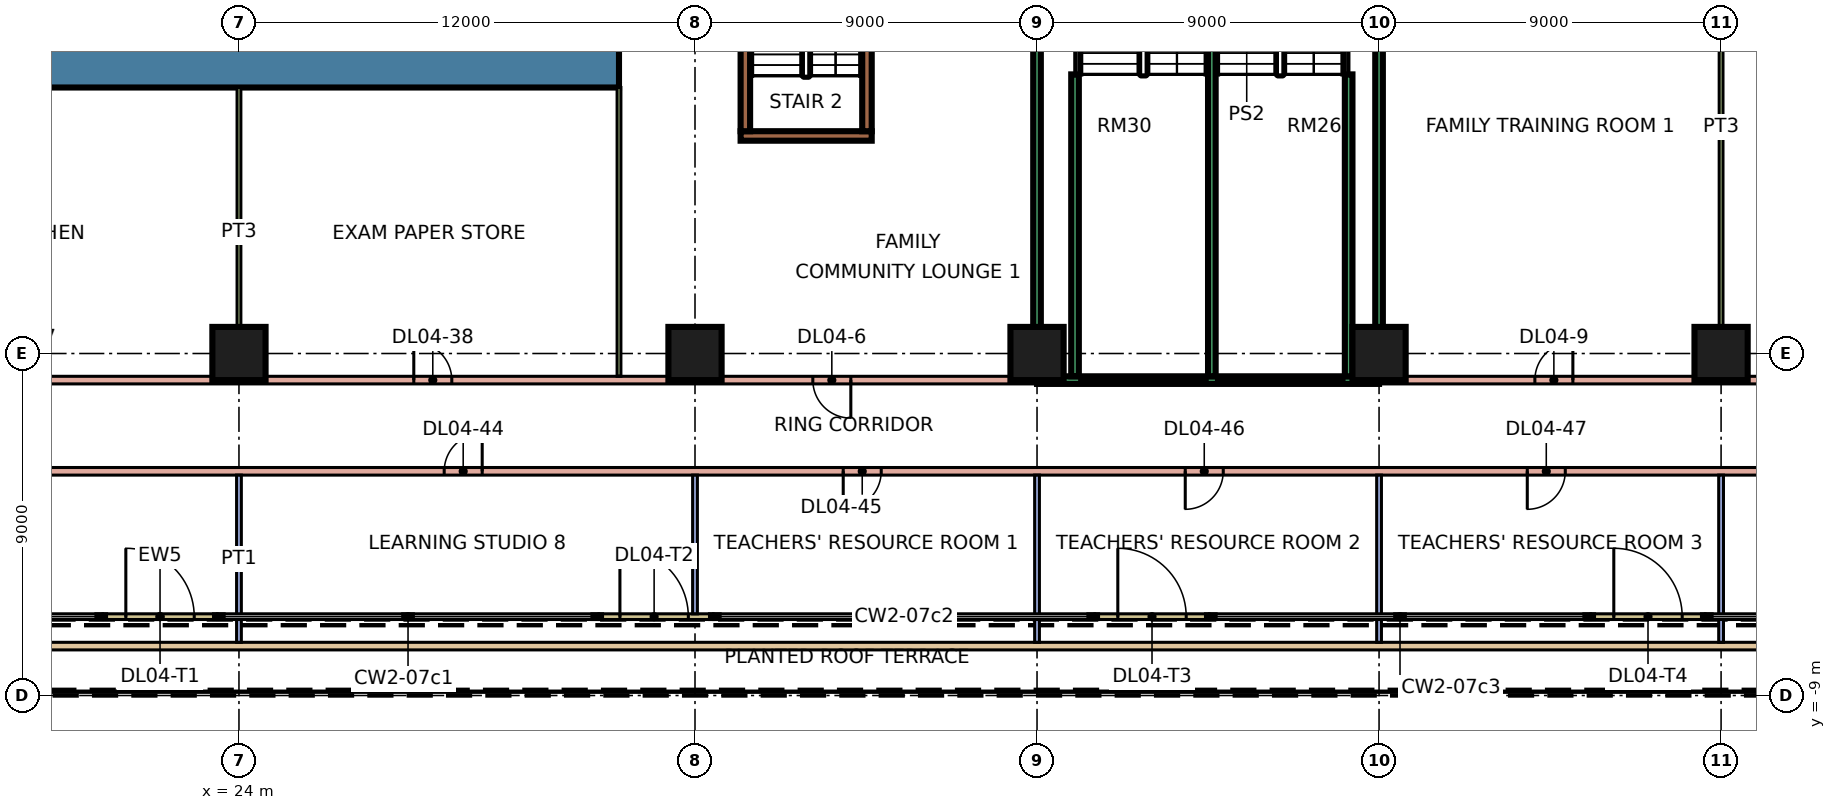
"""IFC4 building model, lengths in metres.
Left out: names, types, materials, properties, quantities, classifications, styles, units other than length and angle.
Written with IfcOpenShell. Run it as: python <this file> out.ifc"""

import sys

from ifc_helpers import new_model, si_unit, direction, frame, frame_2d, origin, origin_2d, place, context, subcontext, project, spatial, rectangle, extrude, element, fill, save


model = new_model("IFC4")
c1 = context("Model", 3, precision=1e-05, world=origin(), true_north=direction((0.0, 1.0)))
c2 = subcontext(c1, "Body", "Model", "MODEL_VIEW")
j1 = project(units=[si_unit("LENGTHUNIT", "METRE"), si_unit("PLANEANGLEUNIT", "RADIAN")], contexts=[c1])
p1 = place(None, origin())
s1 = spatial("IfcSite", under=j1, at=p1, CompositionType="ELEMENT")
p2 = place(p1, origin())
s2 = spatial("IfcBuilding", under=s1, at=p2, CompositionType="ELEMENT")
p3 = place(p2, frame((0.0, 0.0, 21.6)))
s3 = spatial("IfcBuildingStorey", under=s2, at=p3, CompositionType="ELEMENT", Elevation=21.6)
for number, where, z_axis, x_axis in (
    (1, (24.0, 0.0, 0.0), (0.0, 0.0, 1.0), (1.0, 0.0, 0.0)),
    (2, (36.0, 0.0, 0.0), (0.0, 0.0, 1.0), (1.0, 0.0, 0.0)),
    (3, (45.0, 0.0, 0.0), (0.0, 0.0, 1.0), (1.0, 0.0, 0.0)),
    (4, (54.0, 0.0, 0.0), (0.0, 0.0, 1.0), (1.0, 0.0, 0.0)),
    (5, (63.0, 0.0, 0.0), (0.0, 0.0, 1.0), (1.0, 0.0, 0.0)),
):
    element("IfcColumn", number, at=place(p3, frame(where, z_axis=z_axis, x_axis=x_axis)), inside=s3, PredefinedType="COLUMN", context=c2, shape_type="SweptSolid", body=[
        extrude(rectangle(XDim=1.4, YDim=1.4, at=origin_2d()), origin(), (0.0, 0.0, 1.0), 4.8),
    ])
p4 = place(p3, frame((9.0, 7.6, 0.0), z_axis=(0.0, 0.0, 1.0), x_axis=(1.0, 0.0, 0.0)))
e6 = element("IfcWall", 6, at=p4, inside=s3, PredefinedType="SHEAR", context=c2, shape_type="SweptSolid", body=[
    extrude(rectangle(XDim=25.0, YDim=1.2, at=frame_2d((12.5, 0.0))), origin(), (0.0, 0.0, 1.0), 4.8),
])
p5 = place(p3, frame((37.2, 5.725, 0.0), z_axis=(0.0, 0.0, 1.0), x_axis=(1.0, 0.0, 0.0)))
e7 = element("IfcWall", 7, at=p5, inside=s3, PredefinedType="SHEAR", context=c2, shape_type="SweptSolid", body=[
    extrude(rectangle(XDim=3.45, YDim=0.25, at=frame_2d((1.725, 0.0))), origin(), (0.0, 0.0, 1.0), 4.8),
])
for number, where, z_axis, x_axis in (
    (8, (37.325, 5.85, 0.0), (0.0, 0.0, 1.0), (0.0, 1.0, 0.0)),
    (9, (40.525, 5.85, 0.0), (0.0, 0.0, 1.0), (0.0, 1.0, 0.0)),
):
    element("IfcWall", number, at=place(p3, frame(where, z_axis=z_axis, x_axis=x_axis)), inside=s3, PredefinedType="SHEAR", context=c2, shape_type="SweptSolid", body=[
        extrude(rectangle(XDim=6.5, YDim=0.25, at=frame_2d((3.25, 0.0))), origin(), (0.0, 0.0, 1.0), 4.8),
    ])
p6 = place(p3, frame((20.423, -6.925, 0.0), z_axis=(0.0, 0.0, 1.0), x_axis=(1.0, 0.0, 0.0)))
e10 = element("IfcWall", 10, at=p6, inside=s3, PredefinedType="SOLIDWALL", context=c2, shape_type="SweptSolid", body=[
    extrude(rectangle(XDim=3.0, YDim=0.15, at=frame_2d((1.5, 0.0))), origin(), (0.0, 0.0, 1.0), 4.4),
])
p7 = place(p6, frame((0.6, 0.0, 0.0)))
e11 = element("IfcOpeningElement", 11, at=p7, cuts=e10, PredefinedType="OPENING", context=c2, shape_type="SweptSolid", body=[
    extrude(rectangle(XDim=1.8, YDim=2.4, at=frame_2d((0.9, 1.2))), frame((0.0, 0.085, 0.0), z_axis=(0.0, -1.0, 0.0), x_axis=(1.0, 0.0, 0.0)), (0.0, 0.0, 1.0), 0.17),
])
p8 = place(p3, frame((33.474, -6.925, 0.0), z_axis=(0.0, 0.0, 1.0), x_axis=(1.0, 0.0, 0.0)))
e12 = element("IfcWall", 12, at=p8, inside=s3, PredefinedType="SOLIDWALL", context=c2, shape_type="SweptSolid", body=[
    extrude(rectangle(XDim=3.0, YDim=0.15, at=frame_2d((1.5, 0.0))), origin(), (0.0, 0.0, 1.0), 4.4),
])
p9 = place(p8, frame((0.55, 0.0, 0.0)))
e13 = element("IfcOpeningElement", 13, at=p9, cuts=e12, PredefinedType="OPENING", context=c2, shape_type="SweptSolid", body=[
    extrude(rectangle(XDim=1.8, YDim=2.4, at=frame_2d((0.9, 1.2))), frame((0.0, 0.085, 0.0), z_axis=(0.0, -1.0, 0.0), x_axis=(1.0, 0.0, 0.0)), (0.0, 0.0, 1.0), 0.17),
])
p10 = place(p3, frame((46.526, -6.925, 0.0), z_axis=(0.0, 0.0, 1.0), x_axis=(1.0, 0.0, 0.0)))
e14 = element("IfcWall", 14, at=p10, inside=s3, PredefinedType="SOLIDWALL", context=c2, shape_type="SweptSolid", body=[
    extrude(rectangle(XDim=3.0, YDim=0.15, at=frame_2d((1.5, 0.0))), origin(), (0.0, 0.0, 1.0), 4.4),
])
p11 = place(p10, frame((0.6, 0.0, 0.0)))
e15 = element("IfcOpeningElement", 15, at=p11, cuts=e14, PredefinedType="OPENING", context=c2, shape_type="SweptSolid", body=[
    extrude(rectangle(XDim=1.8, YDim=2.4, at=frame_2d((0.9, 1.2))), frame((0.0, 0.085, 0.0), z_axis=(0.0, -1.0, 0.0), x_axis=(1.0, 0.0, 0.0)), (0.0, 0.0, 1.0), 0.17),
])
p12 = place(p3, frame((59.577, -6.925, 0.0), z_axis=(0.0, 0.0, 1.0), x_axis=(1.0, 0.0, 0.0)))
e16 = element("IfcWall", 16, at=p12, inside=s3, PredefinedType="SOLIDWALL", context=c2, shape_type="SweptSolid", body=[
    extrude(rectangle(XDim=3.0, YDim=0.15, at=frame_2d((1.5, 0.0))), origin(), (0.0, 0.0, 1.0), 4.4),
])
p13 = place(p12, frame((0.6, 0.0, 0.0)))
e17 = element("IfcOpeningElement", 17, at=p13, cuts=e16, PredefinedType="OPENING", context=c2, shape_type="SweptSolid", body=[
    extrude(rectangle(XDim=1.8, YDim=2.4, at=frame_2d((0.9, 1.2))), frame((0.0, 0.085, 0.0), z_axis=(0.0, -1.0, 0.0), x_axis=(1.0, 0.0, 0.0)), (0.0, 0.0, 1.0), 0.17),
])
p14 = place(p3, frame((73.068, -7.7, 0.0), z_axis=(0.0, 0.0, 1.0), x_axis=(-1.0, 0.0, 0.0)))
e18 = element("IfcWall", 18, at=p14, inside=s3, PredefinedType="PARAPET", context=c2, shape_type="SweptSolid", body=[
    extrude(rectangle(XDim=63.136, YDim=0.2, at=frame_2d((31.568, 0.0))), origin(), (0.0, 0.0, 1.0), 0.5),
])
p15 = place(p3, frame((3.073, -0.7, 0.0), z_axis=(0.0, 0.0, 1.0), x_axis=(1.0, 0.0, 0.0)))
e19 = element("IfcWall", 19, at=p15, inside=s3, PredefinedType="PARTITIONING", context=c2, shape_type="SweptSolid", body=[
    extrude(rectangle(XDim=41.927, YDim=0.2, at=frame_2d((20.963, 0.0))), origin(), (0.0, 0.0, 1.0), 4.4),
])
p16 = place(p15, frame((36.027, 0.0, 0.0)))
e20 = element("IfcOpeningElement", 20, at=p16, cuts=e19, PredefinedType="OPENING", context=c2, shape_type="SweptSolid", body=[
    extrude(rectangle(XDim=1.0, YDim=2.1, at=frame_2d((0.5, 1.05))), frame((0.0, 0.11, 0.0), z_axis=(0.0, -1.0, 0.0), x_axis=(1.0, 0.0, 0.0)), (0.0, 0.0, 1.0), 0.22),
])
p17 = place(p15, frame((4.527, 0.0, 0.0)))
e21 = element("IfcOpeningElement", 21, at=p17, cuts=e19, PredefinedType="OPENING", context=c2, shape_type="SweptSolid", body=[
    extrude(rectangle(XDim=1.0, YDim=2.1, at=frame_2d((0.5, 1.05))), frame((0.0, 0.11, 0.0), z_axis=(0.0, -1.0, 0.0), x_axis=(1.0, 0.0, 0.0)), (0.0, 0.0, 1.0), 0.22),
])
p18 = place(p15, frame((7.027, 0.0, 0.0)))
e22 = element("IfcOpeningElement", 22, at=p18, cuts=e19, PredefinedType="OPENING", context=c2, shape_type="SweptSolid", body=[
    extrude(rectangle(XDim=1.0, YDim=2.1, at=frame_2d((0.5, 1.05))), frame((0.0, 0.11, 0.0), z_axis=(0.0, -1.0, 0.0), x_axis=(1.0, 0.0, 0.0)), (0.0, 0.0, 1.0), 0.22),
])
p19 = place(p15, frame((14.527, 0.0, 0.0)))
e23 = element("IfcOpeningElement", 23, at=p19, cuts=e19, PredefinedType="OPENING", context=c2, shape_type="SweptSolid", body=[
    extrude(rectangle(XDim=1.0, YDim=2.1, at=frame_2d((0.5, 1.05))), frame((0.0, 0.11, 0.0), z_axis=(0.0, -1.0, 0.0), x_axis=(1.0, 0.0, 0.0)), (0.0, 0.0, 1.0), 0.22),
])
p20 = place(p15, frame((25.527, 0.0, 0.0)))
e24 = element("IfcOpeningElement", 24, at=p20, cuts=e19, PredefinedType="OPENING", context=c2, shape_type="SweptSolid", body=[
    extrude(rectangle(XDim=1.0, YDim=2.1, at=frame_2d((0.5, 1.05))), frame((0.0, 0.11, 0.0), z_axis=(0.0, -1.0, 0.0), x_axis=(1.0, 0.0, 0.0)), (0.0, 0.0, 1.0), 0.22),
])
p21 = place(p3, frame((5.473, -3.1, 0.0), z_axis=(0.0, 0.0, 1.0), x_axis=(1.0, 0.0, 0.0)))
e25 = element("IfcWall", 25, at=p21, inside=s3, PredefinedType="PARTITIONING", context=c2, shape_type="SweptSolid", body=[
    extrude(rectangle(XDim=69.727, YDim=0.2, at=frame_2d((34.863, 0.0))), origin(), (0.0, 0.0, 1.0), 4.4),
])
p22 = place(p21, frame((11.927, 0.0, 0.0)))
e26 = element("IfcOpeningElement", 26, at=p22, cuts=e25, PredefinedType="OPENING", context=c2, shape_type="SweptSolid", body=[
    extrude(rectangle(XDim=1.0, YDim=2.1, at=frame_2d((0.5, 1.05))), frame((0.0, 0.11, 0.0), z_axis=(0.0, -1.0, 0.0), x_axis=(1.0, 0.0, 0.0)), (0.0, 0.0, 1.0), 0.22),
])
p23 = place(p21, frame((23.927, 0.0, 0.0)))
e27 = element("IfcOpeningElement", 27, at=p23, cuts=e25, PredefinedType="OPENING", context=c2, shape_type="SweptSolid", body=[
    extrude(rectangle(XDim=1.0, YDim=2.1, at=frame_2d((0.5, 1.05))), frame((0.0, 0.11, 0.0), z_axis=(0.0, -1.0, 0.0), x_axis=(1.0, 0.0, 0.0)), (0.0, 0.0, 1.0), 0.22),
])
p24 = place(p21, frame((34.427, 0.0, 0.0)))
e28 = element("IfcOpeningElement", 28, at=p24, cuts=e25, PredefinedType="OPENING", context=c2, shape_type="SweptSolid", body=[
    extrude(rectangle(XDim=1.0, YDim=2.1, at=frame_2d((0.5, 1.05))), frame((0.0, 0.11, 0.0), z_axis=(0.0, -1.0, 0.0), x_axis=(1.0, 0.0, 0.0)), (0.0, 0.0, 1.0), 0.22),
])
p25 = place(p21, frame((43.427, 0.0, 0.0)))
e29 = element("IfcOpeningElement", 29, at=p25, cuts=e25, PredefinedType="OPENING", context=c2, shape_type="SweptSolid", body=[
    extrude(rectangle(XDim=1.0, YDim=2.1, at=frame_2d((0.5, 1.05))), frame((0.0, 0.11, 0.0), z_axis=(0.0, -1.0, 0.0), x_axis=(1.0, 0.0, 0.0)), (0.0, 0.0, 1.0), 0.22),
])
p26 = place(p21, frame((52.427, 0.0, 0.0)))
e30 = element("IfcOpeningElement", 30, at=p26, cuts=e25, PredefinedType="OPENING", context=c2, shape_type="SweptSolid", body=[
    extrude(rectangle(XDim=1.0, YDim=2.1, at=frame_2d((0.5, 1.05))), frame((0.0, 0.11, 0.0), z_axis=(0.0, -1.0, 0.0), x_axis=(1.0, 0.0, 0.0)), (0.0, 0.0, 1.0), 0.22),
])
p27 = place(p21, frame((61.427, 0.0, 0.0)))
e31 = element("IfcOpeningElement", 31, at=p27, cuts=e25, PredefinedType="OPENING", context=c2, shape_type="SweptSolid", body=[
    extrude(rectangle(XDim=1.0, YDim=2.1, at=frame_2d((0.5, 1.05))), frame((0.0, 0.11, 0.0), z_axis=(0.0, -1.0, 0.0), x_axis=(1.0, 0.0, 0.0)), (0.0, 0.0, 1.0), 0.22),
])
p28 = place(p3, frame((24.0, -7.6, 0.0), z_axis=(0.0, 0.0, 1.0), x_axis=(0.0, 1.0, 0.0)))
e32 = element("IfcWall", 32, at=p28, inside=s3, PredefinedType="PARTITIONING", context=c2, shape_type="SweptSolid", body=[
    extrude(rectangle(XDim=4.4, YDim=0.125, at=frame_2d((2.2, 0.0))), origin(), (0.0, 0.0, 1.0), 4.4),
])
for number, where, z_axis, x_axis in (
    (33, (24.0, -0.6, 0.0), (0.0, 0.0, 1.0), (0.0, 1.0, 0.0)),
    (34, (34.0, -0.6, 0.0), (0.0, 0.0, 1.0), (0.0, 1.0, 0.0)),
):
    element("IfcWall", number, at=place(p3, frame(where, z_axis=z_axis, x_axis=x_axis)), inside=s3, PredefinedType="PARTITIONING", context=c2, shape_type="SweptSolid", body=[
        extrude(rectangle(XDim=7.6, YDim=0.1, at=frame_2d((3.8, 0.0))), origin(), (0.0, 0.0, 1.0), 4.4),
    ])
p29 = place(p3, frame((36.0, -6.851, 0.0), z_axis=(0.0, 0.0, 1.0), x_axis=(0.0, 1.0, 0.0)))
e35 = element("IfcWall", 35, at=p29, inside=s3, PredefinedType="PARTITIONING", context=c2, shape_type="SweptSolid", body=[
    extrude(rectangle(XDim=3.651, YDim=0.125, at=frame_2d((1.826, 0.0))), origin(), (0.0, 0.0, 1.0), 4.4),
])
p30 = place(p3, frame((45.0, -7.6, 0.0), z_axis=(0.0, 0.0, 1.0), x_axis=(0.0, 1.0, 0.0)))
e36 = element("IfcWall", 36, at=p30, inside=s3, PredefinedType="PARTITIONING", context=c2, shape_type="SweptSolid", body=[
    extrude(rectangle(XDim=4.4, YDim=0.125, at=frame_2d((2.2, 0.0))), origin(), (0.0, 0.0, 1.0), 4.4),
])
p31 = place(p3, frame((45.0, -0.7, 0.0), z_axis=(0.0, 0.0, 1.0), x_axis=(1.0, 0.0, 0.0)))
e37 = element("IfcWall", 37, at=p31, inside=s3, PredefinedType="SOLIDWALL", context=c2, shape_type="SweptSolid", body=[
    extrude(rectangle(XDim=9.0, YDim=0.2, at=frame_2d((4.5, 0.0))), origin(), (0.0, 0.0, 1.0), 4.4),
])
for number, where, z_axis, x_axis in (
    (38, (45.0, -0.6, 0.0), (0.0, 0.0, 1.0), (0.0, 1.0, 0.0)),
    (39, (49.6, -0.6, 0.0), (0.0, 0.0, 1.0), (0.0, 1.0, 0.0)),
):
    element("IfcWall", number, at=place(p3, frame(where, z_axis=z_axis, x_axis=x_axis)), inside=s3, PredefinedType="SOLIDWALL", context=c2, shape_type="SweptSolid", body=[
        extrude(rectangle(XDim=13.1, YDim=0.2, at=frame_2d((6.55, 0.0))), origin(), (0.0, 0.0, 1.0), 4.4),
    ])
p32 = place(p3, frame((54.0, -7.6, 0.0), z_axis=(0.0, 0.0, 1.0), x_axis=(0.0, 1.0, 0.0)))
e40 = element("IfcWall", 40, at=p32, inside=s3, PredefinedType="PARTITIONING", context=c2, shape_type="SweptSolid", body=[
    extrude(rectangle(XDim=4.4, YDim=0.125, at=frame_2d((2.2, 0.0))), origin(), (0.0, 0.0, 1.0), 4.4),
])
p33 = place(p3, frame((54.0, -0.7, 0.0), z_axis=(0.0, 0.0, 1.0), x_axis=(1.0, 0.0, 0.0)))
e41 = element("IfcWall", 41, at=p33, inside=s3, PredefinedType="PARTITIONING", context=c2, shape_type="SweptSolid", body=[
    extrude(rectangle(XDim=21.0, YDim=0.2, at=frame_2d((10.5, 0.0))), origin(), (0.0, 0.0, 1.0), 4.4),
])
p34 = place(p33, frame((4.1, 0.0, 0.0)))
e42 = element("IfcOpeningElement", 42, at=p34, cuts=e41, PredefinedType="OPENING", context=c2, shape_type="SweptSolid", body=[
    extrude(rectangle(XDim=1.0, YDim=2.1, at=frame_2d((0.5, 1.05))), frame((0.0, 0.11, 0.0), z_axis=(0.0, -1.0, 0.0), x_axis=(1.0, 0.0, 0.0)), (0.0, 0.0, 1.0), 0.22),
])
p35 = place(p33, frame((13.3, 0.0, 0.0)))
e43 = element("IfcOpeningElement", 43, at=p35, cuts=e41, PredefinedType="OPENING", context=c2, shape_type="SweptSolid", body=[
    extrude(rectangle(XDim=1.0, YDim=2.1, at=frame_2d((0.5, 1.05))), frame((0.0, 0.11, 0.0), z_axis=(0.0, -1.0, 0.0), x_axis=(1.0, 0.0, 0.0)), (0.0, 0.0, 1.0), 0.22),
])
p36 = place(p33, frame((18.9, 0.0, 0.0)))
e44 = element("IfcOpeningElement", 44, at=p36, cuts=e41, PredefinedType="OPENING", context=c2, shape_type="SweptSolid", body=[
    extrude(rectangle(XDim=1.8, YDim=2.1, at=frame_2d((0.9, 1.05))), frame((0.0, 0.11, 0.0), z_axis=(0.0, -1.0, 0.0), x_axis=(1.0, 0.0, 0.0)), (0.0, 0.0, 1.0), 0.22),
])
p37 = place(p3, frame((54.0, -0.6, 0.0), z_axis=(0.0, 0.0, 1.0), x_axis=(0.0, 1.0, 0.0)))
e45 = element("IfcWall", 45, at=p37, inside=s3, PredefinedType="SOLIDWALL", context=c2, shape_type="SweptSolid", body=[
    extrude(rectangle(XDim=13.1, YDim=0.2, at=frame_2d((6.55, 0.0))), origin(), (0.0, 0.0, 1.0), 4.4),
])
p38 = place(p3, frame((63.0, -7.6, 0.0), z_axis=(0.0, 0.0, 1.0), x_axis=(0.0, 1.0, 0.0)))
e46 = element("IfcWall", 46, at=p38, inside=s3, PredefinedType="PARTITIONING", context=c2, shape_type="SweptSolid", body=[
    extrude(rectangle(XDim=4.4, YDim=0.125, at=frame_2d((2.2, 0.0))), origin(), (0.0, 0.0, 1.0), 4.4),
])
p39 = place(p3, frame((63.0, -0.6, 0.0), z_axis=(0.0, 0.0, 1.0), x_axis=(0.0, 1.0, 0.0)))
e47 = element("IfcWall", 47, at=p39, inside=s3, PredefinedType="PARTITIONING", context=c2, shape_type="SweptSolid", body=[
    extrude(rectangle(XDim=13.1, YDim=0.1, at=frame_2d((6.55, 0.0))), origin(), (0.0, 0.0, 1.0), 4.4),
])
for number, where, z_axis, x_axis in (
    (48, (53.2, -0.6, 0.0), (0.0, 0.0, 1.0), (0.0, 1.0, 0.0)),
    (49, (46.0, -0.6, 0.0), (0.0, 0.0, 1.0), (0.0, 1.0, 0.0)),
):
    element("IfcWall", number, at=place(p3, frame(where, z_axis=z_axis, x_axis=x_axis)), inside=s3, PredefinedType="SOLIDWALL", context=c2, shape_type="SweptSolid", body=[
        extrude(rectangle(XDim=7.945, YDim=0.2, at=frame_2d((3.973, 0.0))), origin(), (0.0, 0.0, 1.0), 4.4),
    ])
p40 = place(p7, origin())
e50 = element("IfcDoor", 50, at=p40, inside=s3, OperationType="DOUBLE_DOOR_SINGLE_SWING", PredefinedType="DOOR", context=c2, shape_type="SweptSolid", body=[
    extrude(rectangle(XDim=1.8, YDim=2.4, at=frame_2d((0.9, 1.2))), frame((0.0, 0.025, 0.0), z_axis=(0.0, -1.0, 0.0), x_axis=(1.0, 0.0, 0.0)), (0.0, 0.0, 1.0), 0.05),
])
fill(e11, e50)
p41 = place(p9, origin())
e51 = element("IfcDoor", 51, at=p41, inside=s3, OperationType="DOUBLE_DOOR_SINGLE_SWING", PredefinedType="DOOR", context=c2, shape_type="SweptSolid", body=[
    extrude(rectangle(XDim=1.8, YDim=2.4, at=frame_2d((0.9, 1.2))), frame((0.0, 0.025, 0.0), z_axis=(0.0, -1.0, 0.0), x_axis=(1.0, 0.0, 0.0)), (0.0, 0.0, 1.0), 0.05),
])
fill(e13, e51)
p42 = place(p11, origin())
e52 = element("IfcDoor", 52, at=p42, inside=s3, OperationType="DOUBLE_DOOR_SINGLE_SWING", PredefinedType="DOOR", context=c2, shape_type="SweptSolid", body=[
    extrude(rectangle(XDim=1.8, YDim=2.4, at=frame_2d((0.9, 1.2))), frame((0.0, 0.025, 0.0), z_axis=(0.0, -1.0, 0.0), x_axis=(1.0, 0.0, 0.0)), (0.0, 0.0, 1.0), 0.05),
])
fill(e15, e52)
p43 = place(p13, origin())
e53 = element("IfcDoor", 53, at=p43, inside=s3, OperationType="DOUBLE_DOOR_SINGLE_SWING", PredefinedType="DOOR", context=c2, shape_type="SweptSolid", body=[
    extrude(rectangle(XDim=1.8, YDim=2.4, at=frame_2d((0.9, 1.2))), frame((0.0, 0.025, 0.0), z_axis=(0.0, -1.0, 0.0), x_axis=(1.0, 0.0, 0.0)), (0.0, 0.0, 1.0), 0.05),
])
fill(e17, e53)
p44 = place(p16, origin())
e54 = element("IfcDoor", 54, at=p44, inside=s3, OperationType="SINGLE_SWING_RIGHT", PredefinedType="DOOR", context=c2, shape_type="SweptSolid", body=[
    extrude(rectangle(XDim=1.0, YDim=2.1, at=frame_2d((0.5, 1.05))), frame((0.0, 0.025, 0.0), z_axis=(0.0, -1.0, 0.0), x_axis=(1.0, 0.0, 0.0)), (0.0, 0.0, 1.0), 0.05),
])
fill(e20, e54)
p45 = place(p34, frame((1.0, 0.0, 0.0), z_axis=(0.0, 0.0, 1.0), x_axis=(-1.0, 0.0, 0.0)))
e55 = element("IfcDoor", 55, at=p45, inside=s3, OperationType="SINGLE_SWING_RIGHT", PredefinedType="DOOR", context=c2, shape_type="SweptSolid", body=[
    extrude(rectangle(XDim=1.0, YDim=2.1, at=frame_2d((0.5, 1.05))), frame((0.0, 0.025, 0.0), z_axis=(0.0, -1.0, 0.0), x_axis=(1.0, 0.0, 0.0)), (0.0, 0.0, 1.0), 0.05),
])
fill(e42, e55)
p46 = place(p20, origin())
e56 = element("IfcDoor", 56, at=p46, inside=s3, OperationType="SINGLE_SWING_LEFT", PredefinedType="DOOR", context=c2, shape_type="SweptSolid", body=[
    extrude(rectangle(XDim=1.0, YDim=2.1, at=frame_2d((0.5, 1.05))), frame((0.0, 0.025, 0.0), z_axis=(0.0, -1.0, 0.0), x_axis=(1.0, 0.0, 0.0)), (0.0, 0.0, 1.0), 0.05),
])
fill(e24, e56)
p47 = place(p23, frame((1.0, 0.0, 0.0), z_axis=(0.0, 0.0, 1.0), x_axis=(-1.0, 0.0, 0.0)))
e57 = element("IfcDoor", 57, at=p47, inside=s3, OperationType="SINGLE_SWING_RIGHT", PredefinedType="DOOR", context=c2, shape_type="SweptSolid", body=[
    extrude(rectangle(XDim=1.0, YDim=2.1, at=frame_2d((0.5, 1.05))), frame((0.0, 0.025, 0.0), z_axis=(0.0, -1.0, 0.0), x_axis=(1.0, 0.0, 0.0)), (0.0, 0.0, 1.0), 0.05),
])
fill(e27, e57)
p48 = place(p24, frame((1.0, 0.0, 0.0), z_axis=(0.0, 0.0, 1.0), x_axis=(-1.0, 0.0, 0.0)))
e58 = element("IfcDoor", 58, at=p48, inside=s3, OperationType="SINGLE_SWING_LEFT", PredefinedType="DOOR", context=c2, shape_type="SweptSolid", body=[
    extrude(rectangle(XDim=1.0, YDim=2.1, at=frame_2d((0.5, 1.05))), frame((0.0, 0.025, 0.0), z_axis=(0.0, -1.0, 0.0), x_axis=(1.0, 0.0, 0.0)), (0.0, 0.0, 1.0), 0.05),
])
fill(e28, e58)
p49 = place(p25, frame((1.0, 0.0, 0.0), z_axis=(0.0, 0.0, 1.0), x_axis=(-1.0, 0.0, 0.0)))
e59 = element("IfcDoor", 59, at=p49, inside=s3, OperationType="SINGLE_SWING_LEFT", PredefinedType="DOOR", context=c2, shape_type="SweptSolid", body=[
    extrude(rectangle(XDim=1.0, YDim=2.1, at=frame_2d((0.5, 1.05))), frame((0.0, 0.025, 0.0), z_axis=(0.0, -1.0, 0.0), x_axis=(1.0, 0.0, 0.0)), (0.0, 0.0, 1.0), 0.05),
])
fill(e29, e59)
p50 = place(p26, frame((1.0, 0.0, 0.0), z_axis=(0.0, 0.0, 1.0), x_axis=(-1.0, 0.0, 0.0)))
e60 = element("IfcDoor", 60, at=p50, inside=s3, OperationType="SINGLE_SWING_LEFT", PredefinedType="DOOR", context=c2, shape_type="SweptSolid", body=[
    extrude(rectangle(XDim=1.0, YDim=2.1, at=frame_2d((0.5, 1.05))), frame((0.0, 0.025, 0.0), z_axis=(0.0, -1.0, 0.0), x_axis=(1.0, 0.0, 0.0)), (0.0, 0.0, 1.0), 0.05),
])
fill(e30, e60)
save(model, sys.argv[1])
